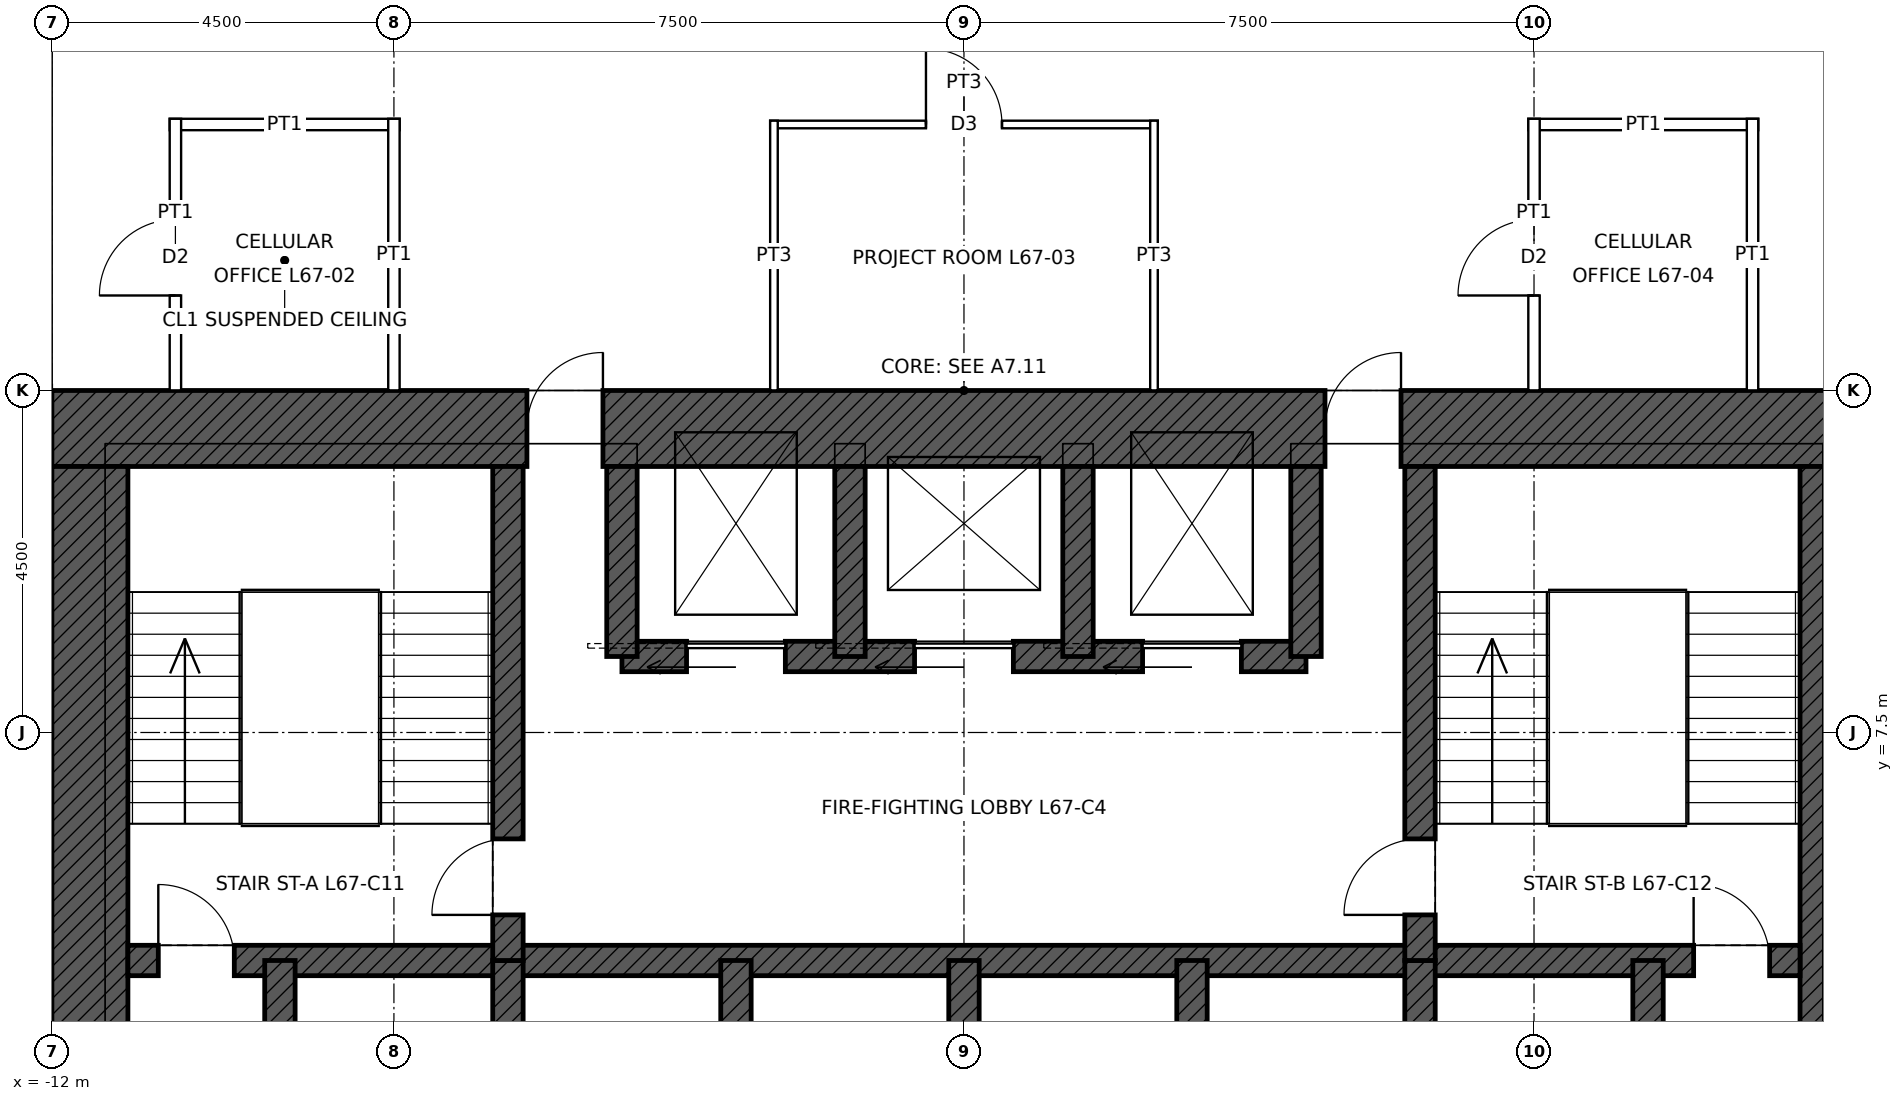
"""IFC4 building model, lengths in metres.
Left out: names, types, materials, properties, quantities, classifications, styles, units other than length and angle.
Written with IfcOpenShell. Run it as: python <this file> out.ifc"""

import sys

from ifc_helpers import new_model, si_unit, direction, frame, frame_2d, origin, place, context, subcontext, project, spatial, rectangle, extrude, element, fill, save


model = new_model("IFC4")
c1 = context("Model", 3, precision=1e-05, world=origin(), true_north=direction((0.0, 1.0)))
c2 = subcontext(c1, "Body", "Model", "MODEL_VIEW")
j1 = project(units=[si_unit("LENGTHUNIT", "METRE"), si_unit("PLANEANGLEUNIT", "RADIAN")], contexts=[c1])
p1 = place(None, origin())
s1 = spatial("IfcSite", under=j1, at=p1, CompositionType="ELEMENT")
p2 = place(p1, origin())
s2 = spatial("IfcBuilding", under=s1, at=p2, CompositionType="ELEMENT")
p3 = place(p2, frame((0.0, 0.0, 303.9)))
s3 = spatial("IfcBuildingStorey", under=s2, at=p3, CompositionType="ELEMENT", Elevation=303.9)
p4 = place(p3, frame((-12.0, 11.5, 0.0), z_axis=(0.0, 0.0, 1.0), x_axis=(1.0, 0.0, 0.0)))
e1 = element("IfcWall", 1, at=p4, inside=s3, PredefinedType="SHEAR", context=c2, shape_type="SweptSolid", body=[
    extrude(rectangle(XDim=24.0, YDim=1.0, at=frame_2d((12.0, 0.0))), origin(), (0.0, 0.0, 1.0), 4.0),
])
p5 = place(p4, frame((6.25, 0.0, 0.0)))
e2 = element("IfcOpeningElement", 2, at=p5, cuts=e1, PredefinedType="OPENING", context=c2, shape_type="SweptSolid", body=[
    extrude(rectangle(XDim=1.0, YDim=2.4, at=frame_2d((0.5, 1.2))), frame((0.0, 0.51, 0.0), z_axis=(0.0, -1.0, 0.0), x_axis=(1.0, 0.0, 0.0)), (0.0, 0.0, 1.0), 1.02),
])
p6 = place(p4, frame((16.75, 0.0, 0.0)))
e3 = element("IfcOpeningElement", 3, at=p6, cuts=e1, PredefinedType="OPENING", context=c2, shape_type="SweptSolid", body=[
    extrude(rectangle(XDim=1.0, YDim=2.4, at=frame_2d((0.5, 1.2))), frame((0.0, 0.51, 0.0), z_axis=(0.0, -1.0, 0.0), x_axis=(1.0, 0.0, 0.0)), (0.0, 0.0, 1.0), 1.02),
])
p7 = place(p3, frame((11.5, 11.0, 0.0), z_axis=(0.0, 0.0, 1.0), x_axis=(0.0, -1.0, 0.0)))
e4 = element("IfcWall", 4, at=p7, inside=s3, PredefinedType="SHEAR", context=c2, shape_type="SweptSolid", body=[
    extrude(rectangle(XDim=22.0, YDim=1.0, at=frame_2d((11.0, 0.0))), origin(), (0.0, 0.0, 1.0), 4.0),
])
p8 = place(p7, frame((10.5, 0.0, 0.0)))
e5 = element("IfcOpeningElement", 5, at=p8, cuts=e4, PredefinedType="OPENING", context=c2, shape_type="SweptSolid", body=[
    extrude(rectangle(XDim=1.0, YDim=2.4, at=frame_2d((0.5, 1.2))), frame((0.0, 0.51, 0.0), z_axis=(0.0, -1.0, 0.0), x_axis=(1.0, 0.0, 0.0)), (0.0, 0.0, 1.0), 1.02),
])
p9 = place(p3, frame((-11.5, -11.0, 0.0), z_axis=(0.0, 0.0, 1.0), x_axis=(0.0, 1.0, 0.0)))
e6 = element("IfcWall", 6, at=p9, inside=s3, PredefinedType="SHEAR", context=c2, shape_type="SweptSolid", body=[
    extrude(rectangle(XDim=22.0, YDim=1.0, at=frame_2d((11.0, 0.0))), origin(), (0.0, 0.0, 1.0), 4.0),
])
p10 = place(p9, frame((10.5, 0.0, 0.0)))
e7 = element("IfcOpeningElement", 7, at=p10, cuts=e6, PredefinedType="OPENING", context=c2, shape_type="SweptSolid", body=[
    extrude(rectangle(XDim=1.0, YDim=2.4, at=frame_2d((0.5, 1.2))), frame((0.0, 0.51, 0.0), z_axis=(0.0, -1.0, 0.0), x_axis=(1.0, 0.0, 0.0)), (0.0, 0.0, 1.0), 1.02),
])
p11 = place(p3, frame((-11.0, 4.5, 0.0), z_axis=(0.0, 0.0, 1.0), x_axis=(1.0, 0.0, 0.0)))
e8 = element("IfcWall", 8, at=p11, inside=s3, PredefinedType="SHEAR", context=c2, shape_type="SweptSolid", body=[
    extrude(rectangle(XDim=22.0, YDim=0.4, at=frame_2d((11.0, 0.0))), origin(), (0.0, 0.0, 1.0), 4.0),
])
p12 = place(p11, frame((0.4, 0.0, 0.0)))
e9 = element("IfcOpeningElement", 9, at=p12, cuts=e8, PredefinedType="OPENING", context=c2, shape_type="SweptSolid", body=[
    extrude(rectangle(XDim=1.0, YDim=2.1, at=frame_2d((0.5, 1.05))), frame((0.0, 0.21, 0.0), z_axis=(0.0, -1.0, 0.0), x_axis=(1.0, 0.0, 0.0)), (0.0, 0.0, 1.0), 0.42),
])
p13 = place(p11, frame((20.6, 0.0, 0.0)))
e10 = element("IfcOpeningElement", 10, at=p13, cuts=e8, PredefinedType="OPENING", context=c2, shape_type="SweptSolid", body=[
    extrude(rectangle(XDim=1.0, YDim=2.1, at=frame_2d((0.5, 1.05))), frame((0.0, 0.21, 0.0), z_axis=(0.0, -1.0, 0.0), x_axis=(1.0, 0.0, 0.0)), (0.0, 0.0, 1.0), 0.42),
])
p14 = place(p3, frame((-4.5, 8.5, 0.0), z_axis=(0.0, 0.0, 1.0), x_axis=(1.0, 0.0, 0.0)))
e11 = element("IfcWall", 11, at=p14, inside=s3, PredefinedType="SHEAR", context=c2, shape_type="SweptSolid", body=[
    extrude(rectangle(XDim=9.0, YDim=0.4, at=frame_2d((4.5, 0.0))), origin(), (0.0, 0.0, 1.0), 4.0),
])
p15 = place(p14, frame((0.85, 0.0, 0.0)))
e12 = element("IfcOpeningElement", 12, at=p15, cuts=e11, PredefinedType="OPENING", context=c2, shape_type="SweptSolid", body=[
    extrude(rectangle(XDim=1.3, YDim=2.4, at=frame_2d((0.65, 1.2))), frame((0.0, 0.21, 0.0), z_axis=(0.0, -1.0, 0.0), x_axis=(1.0, 0.0, 0.0)), (0.0, 0.0, 1.0), 0.42),
])
p16 = place(p14, frame((6.85, 0.0, 0.0)))
e13 = element("IfcOpeningElement", 13, at=p16, cuts=e11, PredefinedType="OPENING", context=c2, shape_type="SweptSolid", body=[
    extrude(rectangle(XDim=1.3, YDim=2.4, at=frame_2d((0.65, 1.2))), frame((0.0, 0.21, 0.0), z_axis=(0.0, -1.0, 0.0), x_axis=(1.0, 0.0, 0.0)), (0.0, 0.0, 1.0), 0.42),
])
p17 = place(p14, frame((3.85, 0.0, 0.0)))
e14 = element("IfcOpeningElement", 14, at=p17, cuts=e11, PredefinedType="OPENING", context=c2, shape_type="SweptSolid", body=[
    extrude(rectangle(XDim=1.3, YDim=2.4, at=frame_2d((0.65, 1.2))), frame((0.0, 0.21, 0.0), z_axis=(0.0, -1.0, 0.0), x_axis=(1.0, 0.0, 0.0)), (0.0, 0.0, 1.0), 0.42),
])
for number, where, z_axis, x_axis in (
    (15, (-9.0, 1.5, 0.0), (0.0, 0.0, 1.0), (0.0, 1.0, 0.0)),
    (16, (9.0, 1.5, 0.0), (0.0, 0.0, 1.0), (0.0, 1.0, 0.0)),
    (17, (-6.0, 1.5, 0.0), (0.0, 0.0, 1.0), (0.0, 1.0, 0.0)),
    (18, (-3.0, 1.5, 0.0), (0.0, 0.0, 1.0), (0.0, 1.0, 0.0)),
    (19, (0.0, 1.5, 0.0), (0.0, 0.0, 1.0), (0.0, 1.0, 0.0)),
    (20, (3.0, 1.5, 0.0), (0.0, 0.0, 1.0), (0.0, 1.0, 0.0)),
    (21, (6.0, 1.5, 0.0), (0.0, 0.0, 1.0), (0.0, 1.0, 0.0)),
):
    element("IfcWall", number, at=place(p3, frame(where, z_axis=z_axis, x_axis=x_axis)), inside=s3, PredefinedType="SHEAR", context=c2, shape_type="SweptSolid", body=[
        extrude(rectangle(XDim=3.0, YDim=0.4, at=frame_2d((1.5, 0.0))), origin(), (0.0, 0.0, 1.0), 4.0),
    ])
p18 = place(p3, frame((-6.0, 4.5, 0.0), z_axis=(0.0, 0.0, 1.0), x_axis=(0.0, 1.0, 0.0)))
e22 = element("IfcWall", 22, at=p18, inside=s3, PredefinedType="SHEAR", context=c2, shape_type="SweptSolid", body=[
    extrude(rectangle(XDim=6.5, YDim=0.4, at=frame_2d((3.25, 0.0))), origin(), (0.0, 0.0, 1.0), 4.0),
])
p19 = place(p18, frame((0.6, 0.0, 0.0)))
e23 = element("IfcOpeningElement", 23, at=p19, cuts=e22, PredefinedType="OPENING", context=c2, shape_type="SweptSolid", body=[
    extrude(rectangle(XDim=1.0, YDim=2.1, at=frame_2d((0.5, 1.05))), frame((0.0, 0.21, 0.0), z_axis=(0.0, -1.0, 0.0), x_axis=(1.0, 0.0, 0.0)), (0.0, 0.0, 1.0), 0.42),
])
p20 = place(p3, frame((6.0, 4.5, 0.0), z_axis=(0.0, 0.0, 1.0), x_axis=(0.0, 1.0, 0.0)))
e24 = element("IfcWall", 24, at=p20, inside=s3, PredefinedType="SHEAR", context=c2, shape_type="SweptSolid", body=[
    extrude(rectangle(XDim=6.5, YDim=0.4, at=frame_2d((3.25, 0.0))), origin(), (0.0, 0.0, 1.0), 4.0),
])
p21 = place(p20, frame((0.6, 0.0, 0.0)))
e25 = element("IfcOpeningElement", 25, at=p21, cuts=e24, PredefinedType="OPENING", context=c2, shape_type="SweptSolid", body=[
    extrude(rectangle(XDim=1.0, YDim=2.1, at=frame_2d((0.5, 1.05))), frame((0.0, 0.21, 0.0), z_axis=(0.0, -1.0, 0.0), x_axis=(1.0, 0.0, 0.0)), (0.0, 0.0, 1.0), 0.42),
])
for number, where, z_axis, x_axis in (
    (26, (-4.5, 8.5, 0.0), (0.0, 0.0, 1.0), (0.0, 1.0, 0.0)),
    (27, (4.5, 8.5, 0.0), (0.0, 0.0, 1.0), (0.0, 1.0, 0.0)),
    (28, (-1.5, 8.5, 0.0), (0.0, 0.0, 1.0), (0.0, 1.0, 0.0)),
    (29, (1.5, 8.5, 0.0), (0.0, 0.0, 1.0), (0.0, 1.0, 0.0)),
):
    element("IfcWall", number, at=place(p3, frame(where, z_axis=z_axis, x_axis=x_axis)), inside=s3, PredefinedType="SHEAR", context=c2, shape_type="SweptSolid", body=[
        extrude(rectangle(XDim=2.5, YDim=0.4, at=frame_2d((1.25, 0.0))), origin(), (0.0, 0.0, 1.0), 4.0),
    ])
p22 = place(p3, frame((-10.45, 15.5, 0.0), z_axis=(0.0, 0.0, 1.0), x_axis=(1.0, 0.0, 0.0)))
e30 = element("IfcWall", 30, at=p22, inside=s3, PredefinedType="PARTITIONING", context=c2, shape_type="SweptSolid", body=[
    extrude(rectangle(XDim=3.025, YDim=0.15, at=frame_2d((1.512, 0.0))), origin(), (0.0, 0.0, 1.0), 3.85),
])
p23 = place(p3, frame((-2.55, 15.5, 0.0), z_axis=(0.0, 0.0, 1.0), x_axis=(1.0, 0.0, 0.0)))
e31 = element("IfcWall", 31, at=p23, inside=s3, PredefinedType="PARTITIONING", context=c2, shape_type="SweptSolid", body=[
    extrude(rectangle(XDim=5.1, YDim=0.1, at=frame_2d((2.55, 0.0))), origin(), (0.0, 0.0, 1.0), 3.85),
])
p24 = place(p23, frame((2.05, 0.0, 0.0)))
e32 = element("IfcOpeningElement", 32, at=p24, cuts=e31, PredefinedType="OPENING", context=c2, shape_type="SweptSolid", body=[
    extrude(rectangle(XDim=1.0, YDim=2.1, at=frame_2d((0.5, 1.05))), frame((0.0, 0.06, 0.0), z_axis=(0.0, -1.0, 0.0), x_axis=(1.0, 0.0, 0.0)), (0.0, 0.0, 1.0), 0.12),
])
p25 = place(p3, frame((7.425, 15.5, 0.0), z_axis=(0.0, 0.0, 1.0), x_axis=(1.0, 0.0, 0.0)))
e33 = element("IfcWall", 33, at=p25, inside=s3, PredefinedType="PARTITIONING", context=c2, shape_type="SweptSolid", body=[
    extrude(rectangle(XDim=3.025, YDim=0.15, at=frame_2d((1.512, 0.0))), origin(), (0.0, 0.0, 1.0), 3.85),
])
p26 = place(p3, frame((-10.375, 12.0, 0.0), z_axis=(0.0, 0.0, 1.0), x_axis=(0.0, 1.0, 0.0)))
e34 = element("IfcWall", 34, at=p26, inside=s3, PredefinedType="PARTITIONING", context=c2, shape_type="SweptSolid", body=[
    extrude(rectangle(XDim=3.575, YDim=0.15, at=frame_2d((1.788, 0.0))), origin(), (0.0, 0.0, 1.0), 3.85),
])
p27 = place(p26, frame((1.25, 0.0, 0.0)))
e35 = element("IfcOpeningElement", 35, at=p27, cuts=e34, PredefinedType="OPENING", context=c2, shape_type="SweptSolid", body=[
    extrude(rectangle(XDim=1.0, YDim=2.1, at=frame_2d((0.5, 1.05))), frame((0.0, 0.085, 0.0), z_axis=(0.0, -1.0, 0.0), x_axis=(1.0, 0.0, 0.0)), (0.0, 0.0, 1.0), 0.17),
])
p28 = place(p3, frame((-7.5, 12.0, 0.0), z_axis=(0.0, 0.0, 1.0), x_axis=(0.0, 1.0, 0.0)))
e36 = element("IfcWall", 36, at=p28, inside=s3, PredefinedType="PARTITIONING", context=c2, shape_type="SweptSolid", body=[
    extrude(rectangle(XDim=3.575, YDim=0.15, at=frame_2d((1.788, 0.0))), origin(), (0.0, 0.0, 1.0), 3.243),
])
for number, where, z_axis, x_axis in (
    (37, (-2.5, 12.0, 0.0), (0.0, 0.0, 1.0), (0.0, 1.0, 0.0)),
    (38, (2.5, 12.0, 0.0), (0.0, 0.0, 1.0), (0.0, 1.0, 0.0)),
):
    element("IfcWall", number, at=place(p3, frame(where, z_axis=z_axis, x_axis=x_axis)), inside=s3, PredefinedType="PARTITIONING", context=c2, shape_type="SweptSolid", body=[
        extrude(rectangle(XDim=3.55, YDim=0.1, at=frame_2d((1.775, 0.0))), origin(), (0.0, 0.0, 1.0), 3.85),
    ])
p29 = place(p3, frame((7.5, 12.0, 0.0), z_axis=(0.0, 0.0, 1.0), x_axis=(0.0, 1.0, 0.0)))
e39 = element("IfcWall", 39, at=p29, inside=s3, PredefinedType="PARTITIONING", context=c2, shape_type="SweptSolid", body=[
    extrude(rectangle(XDim=3.575, YDim=0.15, at=frame_2d((1.788, 0.0))), origin(), (0.0, 0.0, 1.0), 3.243),
])
p30 = place(p29, frame((1.25, 0.0, 0.0)))
e40 = element("IfcOpeningElement", 40, at=p30, cuts=e39, PredefinedType="OPENING", context=c2, shape_type="SweptSolid", body=[
    extrude(rectangle(XDim=1.0, YDim=2.1, at=frame_2d((0.5, 1.05))), frame((0.0, 0.085, 0.0), z_axis=(0.0, -1.0, 0.0), x_axis=(1.0, 0.0, 0.0)), (0.0, 0.0, 1.0), 0.17),
])
p31 = place(p3, frame((10.375, 12.0, 0.0), z_axis=(0.0, 0.0, 1.0), x_axis=(0.0, 1.0, 0.0)))
e41 = element("IfcWall", 41, at=p31, inside=s3, PredefinedType="PARTITIONING", context=c2, shape_type="SweptSolid", body=[
    extrude(rectangle(XDim=3.575, YDim=0.15, at=frame_2d((1.788, 0.0))), origin(), (0.0, 0.0, 1.0), 3.85),
])
p32 = place(p12, origin())
e42 = element("IfcDoor", 42, at=p32, inside=s3, OperationType="SINGLE_SWING_LEFT", PredefinedType="DOOR", context=c2, shape_type="SweptSolid", body=[
    extrude(rectangle(XDim=1.0, YDim=2.1, at=frame_2d((0.5, 1.05))), frame((0.0, 0.025, 0.0), z_axis=(0.0, -1.0, 0.0), x_axis=(1.0, 0.0, 0.0)), (0.0, 0.0, 1.0), 0.05),
])
fill(e9, e42)
p33 = place(p13, origin())
e43 = element("IfcDoor", 43, at=p33, inside=s3, OperationType="SINGLE_SWING_LEFT", PredefinedType="DOOR", context=c2, shape_type="SweptSolid", body=[
    extrude(rectangle(XDim=1.0, YDim=2.1, at=frame_2d((0.5, 1.05))), frame((0.0, 0.025, 0.0), z_axis=(0.0, -1.0, 0.0), x_axis=(1.0, 0.0, 0.0)), (0.0, 0.0, 1.0), 0.05),
])
fill(e10, e43)
p34 = place(p19, origin())
e44 = element("IfcDoor", 44, at=p34, inside=s3, OperationType="SINGLE_SWING_LEFT", PredefinedType="DOOR", context=c2, shape_type="SweptSolid", body=[
    extrude(rectangle(XDim=1.0, YDim=2.1, at=frame_2d((0.5, 1.05))), frame((0.0, 0.025, 0.0), z_axis=(0.0, -1.0, 0.0), x_axis=(1.0, 0.0, 0.0)), (0.0, 0.0, 1.0), 0.05),
])
fill(e23, e44)
p35 = place(p21, origin())
e45 = element("IfcDoor", 45, at=p35, inside=s3, OperationType="SINGLE_SWING_LEFT", PredefinedType="DOOR", context=c2, shape_type="SweptSolid", body=[
    extrude(rectangle(XDim=1.0, YDim=2.1, at=frame_2d((0.5, 1.05))), frame((0.0, 0.025, 0.0), z_axis=(0.0, -1.0, 0.0), x_axis=(1.0, 0.0, 0.0)), (0.0, 0.0, 1.0), 0.05),
])
fill(e25, e45)
p36 = place(p5, origin())
e46 = element("IfcDoor", 46, at=p36, inside=s3, OperationType="SINGLE_SWING_RIGHT", PredefinedType="DOOR", context=c2, shape_type="SweptSolid", body=[
    extrude(rectangle(XDim=1.0, YDim=2.4, at=frame_2d((0.5, 1.2))), frame((0.0, 0.485, 0.0), z_axis=(0.0, -1.0, 0.0), x_axis=(1.0, 0.0, 0.0)), (0.0, 0.0, 1.0), 0.05),
])
fill(e2, e46)
p37 = place(p6, origin())
e47 = element("IfcDoor", 47, at=p37, inside=s3, OperationType="SINGLE_SWING_RIGHT", PredefinedType="DOOR", context=c2, shape_type="SweptSolid", body=[
    extrude(rectangle(XDim=1.0, YDim=2.4, at=frame_2d((0.5, 1.2))), frame((0.0, 0.485, 0.0), z_axis=(0.0, -1.0, 0.0), x_axis=(1.0, 0.0, 0.0)), (0.0, 0.0, 1.0), 0.05),
])
fill(e3, e47)
p38 = place(p15, origin())
e48 = element("IfcDoor", 48, at=p38, inside=s3, OperationType="SLIDING_TO_LEFT", PredefinedType="DOOR", context=c2, shape_type="SweptSolid", body=[
    extrude(rectangle(XDim=1.3, YDim=2.4, at=frame_2d((0.65, 1.2))), frame((0.0, 0.025, 0.0), z_axis=(0.0, -1.0, 0.0), x_axis=(1.0, 0.0, 0.0)), (0.0, 0.0, 1.0), 0.05),
])
fill(e12, e48)
p39 = place(p16, origin())
e49 = element("IfcDoor", 49, at=p39, inside=s3, OperationType="SLIDING_TO_LEFT", PredefinedType="DOOR", context=c2, shape_type="SweptSolid", body=[
    extrude(rectangle(XDim=1.3, YDim=2.4, at=frame_2d((0.65, 1.2))), frame((0.0, 0.025, 0.0), z_axis=(0.0, -1.0, 0.0), x_axis=(1.0, 0.0, 0.0)), (0.0, 0.0, 1.0), 0.05),
])
fill(e13, e49)
p40 = place(p17, origin())
e50 = element("IfcDoor", 50, at=p40, inside=s3, OperationType="SLIDING_TO_LEFT", PredefinedType="DOOR", context=c2, shape_type="SweptSolid", body=[
    extrude(rectangle(XDim=1.3, YDim=2.4, at=frame_2d((0.65, 1.2))), frame((0.0, 0.025, 0.0), z_axis=(0.0, -1.0, 0.0), x_axis=(1.0, 0.0, 0.0)), (0.0, 0.0, 1.0), 0.05),
])
fill(e14, e50)
p41 = place(p27, origin())
e51 = element("IfcDoor", 51, at=p41, inside=s3, OperationType="SINGLE_SWING_LEFT", PredefinedType="DOOR", context=c2, shape_type="SweptSolid", body=[
    extrude(rectangle(XDim=1.0, YDim=2.1, at=frame_2d((0.5, 1.05))), frame((0.0, 0.025, 0.0), z_axis=(0.0, -1.0, 0.0), x_axis=(1.0, 0.0, 0.0)), (0.0, 0.0, 1.0), 0.05),
])
fill(e35, e51)
p42 = place(p24, origin())
e52 = element("IfcDoor", 52, at=p42, inside=s3, OperationType="SINGLE_SWING_LEFT", PredefinedType="DOOR", context=c2, shape_type="SweptSolid", body=[
    extrude(rectangle(XDim=1.0, YDim=2.1, at=frame_2d((0.5, 1.05))), frame((0.0, 0.025, 0.0), z_axis=(0.0, -1.0, 0.0), x_axis=(1.0, 0.0, 0.0)), (0.0, 0.0, 1.0), 0.05),
])
fill(e32, e52)
p43 = place(p30, origin())
e53 = element("IfcDoor", 53, at=p43, inside=s3, OperationType="SINGLE_SWING_LEFT", PredefinedType="DOOR", context=c2, shape_type="SweptSolid", body=[
    extrude(rectangle(XDim=1.0, YDim=2.1, at=frame_2d((0.5, 1.05))), frame((0.0, 0.025, 0.0), z_axis=(0.0, -1.0, 0.0), x_axis=(1.0, 0.0, 0.0)), (0.0, 0.0, 1.0), 0.05),
])
fill(e40, e53)
save(model, sys.argv[1])
